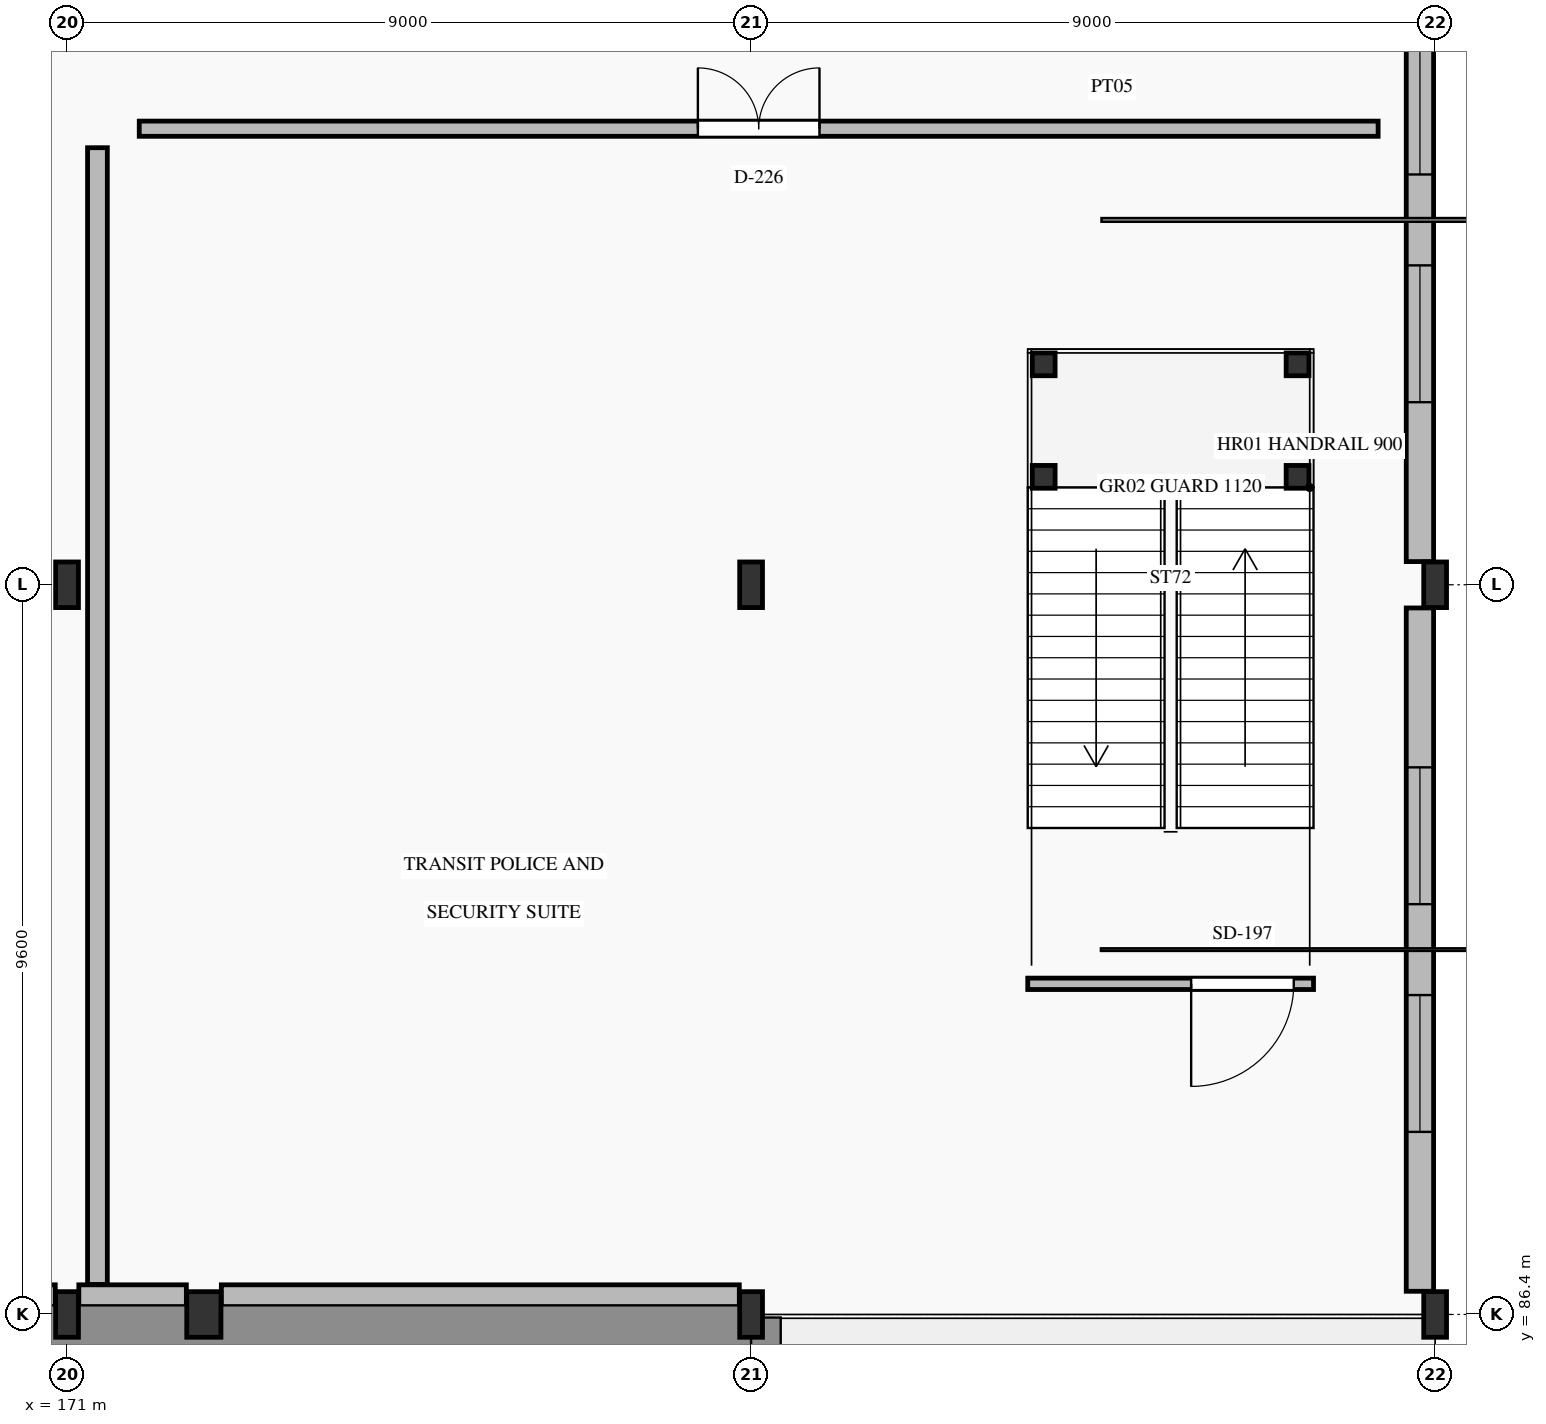
"""IFC4 building model, lengths in metres.
Left out: names, types, materials, properties, quantities, classifications, styles, units other than length and angle.
Written with IfcOpenShell. Run it as: python <this file> out.ifc"""

import sys

from ifc_helpers import new_model, si_unit, direction, frame, frame_2d, origin, origin_2d, place, context, subcontext, project, spatial, rectangle, i_section, extrude, element, fill, save


model = new_model("IFC4")
c1 = context("Model", 3, precision=1e-05, world=origin(), true_north=direction((0.0, 1.0)))
c2 = subcontext(c1, "Body", "Model", "MODEL_VIEW")
j1 = project(units=[si_unit("LENGTHUNIT", "METRE"), si_unit("PLANEANGLEUNIT", "RADIAN")], contexts=[c1])
p1 = place(None, origin())
s1 = spatial("IfcSite", under=j1, at=p1, CompositionType="ELEMENT")
p2 = place(p1, origin())
s2 = spatial("IfcBuilding", under=s1, at=p2, CompositionType="ELEMENT")
p3 = place(p2, origin())
s3 = spatial("IfcBuildingStorey", under=s2, at=p3, CompositionType="ELEMENT", Elevation=0.0)
for number, where, z_axis, x_axis in (
    (1, (171.0, 86.4, 0.0), (0.0, 0.0, 1.0), (1.0, 0.0, 0.0)),
    (2, (171.0, 96.0, 0.0), (0.0, 0.0, 1.0), (1.0, 0.0, 0.0)),
    (3, (180.0, 86.4, 0.0), (0.0, 0.0, 1.0), (1.0, 0.0, 0.0)),
    (4, (180.0, 96.0, 0.0), (0.0, 0.0, 1.0), (1.0, 0.0, 0.0)),
    (5, (189.0, 86.4, 0.0), (0.0, 0.0, 1.0), (1.0, 0.0, 0.0)),
    (6, (189.0, 96.0, 0.0), (0.0, 0.0, 1.0), (1.0, 0.0, 0.0)),
):
    element("IfcColumn", number, at=place(p3, frame(where, z_axis=z_axis, x_axis=x_axis)), inside=s3, PredefinedType="COLUMN", context=c2, shape_type="SweptSolid", body=[
        extrude(i_section(OverallWidth=0.3, OverallDepth=0.6, WebThickness=0.015, FlangeThickness=0.03, FilletRadius=0.027, at=origin_2d()), origin(), (0.0, 0.0, 1.0), 6.0),
    ])
p4 = place(p3, frame((172.8, 86.4, 0.0), z_axis=(0.0, 0.0, 1.0), x_axis=(1.0, 0.0, 0.0)))
e7 = element("IfcColumn", 7, at=p4, inside=s3, PredefinedType="PILASTER", context=c2, shape_type="SweptSolid", body=[
    extrude(rectangle(XDim=0.45, YDim=0.6, at=origin_2d()), origin(), (0.0, 0.0, 1.0), 6.0),
])
p5 = place(p3, frame((164.03, 86.6, 0.0), z_axis=(0.0, 0.0, 1.0), x_axis=(1.0, 0.0, 0.0)))
e8 = element("IfcWall", 8, at=p5, inside=s3, PredefinedType="SOLIDWALL", context=c2, shape_type="SweptSolid", body=[
    extrude(rectangle(XDim=6.815, YDim=0.38, at=frame_2d((3.407, 0.0))), origin(), (0.0, 0.0, 1.0), 5.49),
])
p6 = place(p3, frame((171.155, 86.6, 0.0), z_axis=(0.0, 0.0, 1.0), x_axis=(1.0, 0.0, 0.0)))
e9 = element("IfcWall", 9, at=p6, inside=s3, PredefinedType="SOLIDWALL", context=c2, shape_type="SweptSolid", body=[
    extrude(rectangle(XDim=1.415, YDim=0.38, at=frame_2d((0.708, 0.0))), origin(), (0.0, 0.0, 1.0), 5.49),
])
p7 = place(p3, frame((173.03, 86.6, 0.0), z_axis=(0.0, 0.0, 1.0), x_axis=(1.0, 0.0, 0.0)))
e10 = element("IfcWall", 10, at=p7, inside=s3, PredefinedType="SOLIDWALL", context=c2, shape_type="SweptSolid", body=[
    extrude(rectangle(XDim=6.815, YDim=0.38, at=frame_2d((3.407, 0.0))), origin(), (0.0, 0.0, 1.0), 5.49),
])
p8 = place(p3, frame((188.8, 86.705, 0.0), z_axis=(0.0, 0.0, 1.0), x_axis=(0.0, 1.0, 0.0)))
e11 = element("IfcWall", 11, at=p8, inside=s3, PredefinedType="SOLIDWALL", context=c2, shape_type="SweptSolid", body=[
    extrude(rectangle(XDim=8.99, YDim=0.36, at=frame_2d((4.495, 0.0))), origin(), (0.0, 0.0, 1.0), 5.4),
])
p9 = place(p8, frame((2.097, 0.0, 0.95)))
e12 = element("IfcOpeningElement", 12, at=p9, cuts=e11, PredefinedType="OPENING", context=c2, shape_type="SweptSolid", body=[
    extrude(rectangle(XDim=1.8, YDim=2.8, at=frame_2d((0.9, 1.4))), frame((0.0, 0.195, 0.0), z_axis=(0.0, -1.0, 0.0), x_axis=(1.0, 0.0, 0.0)), (0.0, 0.0, 1.0), 0.39),
])
p10 = place(p8, frame((5.093, 0.0, 0.95)))
e13 = element("IfcOpeningElement", 13, at=p10, cuts=e11, PredefinedType="OPENING", context=c2, shape_type="SweptSolid", body=[
    extrude(rectangle(XDim=1.8, YDim=2.8, at=frame_2d((0.9, 1.4))), frame((0.0, 0.195, 0.0), z_axis=(0.0, -1.0, 0.0), x_axis=(1.0, 0.0, 0.0)), (0.0, 0.0, 1.0), 0.39),
])
p11 = place(p3, frame((188.8, 96.305, 0.0), z_axis=(0.0, 0.0, 1.0), x_axis=(0.0, 1.0, 0.0)))
e14 = element("IfcWall", 14, at=p11, inside=s3, PredefinedType="SOLIDWALL", context=c2, shape_type="SweptSolid", body=[
    extrude(rectangle(XDim=8.99, YDim=0.36, at=frame_2d((4.495, 0.0))), origin(), (0.0, 0.0, 1.0), 5.4),
])
p12 = place(p11, frame((2.097, 0.0, 0.95)))
e15 = element("IfcOpeningElement", 15, at=p12, cuts=e14, PredefinedType="OPENING", context=c2, shape_type="SweptSolid", body=[
    extrude(rectangle(XDim=1.8, YDim=2.8, at=frame_2d((0.9, 1.4))), frame((0.0, 0.195, 0.0), z_axis=(0.0, -1.0, 0.0), x_axis=(1.0, 0.0, 0.0)), (0.0, 0.0, 1.0), 0.39),
])
p13 = place(p11, frame((5.093, 0.0, 0.95)))
e16 = element("IfcOpeningElement", 16, at=p13, cuts=e14, PredefinedType="OPENING", context=c2, shape_type="SweptSolid", body=[
    extrude(rectangle(XDim=1.8, YDim=2.8, at=frame_2d((0.9, 1.4))), frame((0.0, 0.195, 0.0), z_axis=(0.0, -1.0, 0.0), x_axis=(1.0, 0.0, 0.0)), (0.0, 0.0, 1.0), 0.39),
])
for number, where, z_axis, x_axis in (
    (17, (183.85, 98.9, 0.0), (0.0, 0.0, 1.0), (1.0, 0.0, 0.0)),
    (18, (183.85, 97.42, 0.0), (0.0, 0.0, 1.0), (1.0, 0.0, 0.0)),
    (19, (187.19, 98.9, 0.0), (0.0, 0.0, 1.0), (1.0, 0.0, 0.0)),
    (20, (187.19, 97.42, 0.0), (0.0, 0.0, 1.0), (1.0, 0.0, 0.0)),
):
    element("IfcColumn", number, at=place(p3, frame(where, z_axis=z_axis, x_axis=x_axis)), inside=s3, PredefinedType="COLUMN", context=c2, shape_type="SweptSolid", body=[
        extrude(i_section(OverallWidth=0.3, OverallDepth=0.3, WebThickness=0.011, FlangeThickness=0.019, FilletRadius=0.027, at=origin_2d()), origin(), (0.0, 0.0, 1.0), 2.8),
    ])
p14 = place(p3, frame((183.64, 90.75, 0.0), z_axis=(0.0, 0.0, 1.0), x_axis=(1.0, 0.0, 0.0)))
e21 = element("IfcWall", 21, at=p14, inside=s3, PredefinedType="PARTITIONING", context=c2, shape_type="SweptSolid", body=[
    extrude(rectangle(XDim=3.76, YDim=0.15, at=frame_2d((1.88, 0.0))), origin(), (0.0, 0.0, 1.0), 5.72),
])
p15 = place(p14, frame((2.15, 0.0, 0.0)))
e22 = element("IfcOpeningElement", 22, at=p15, cuts=e21, PredefinedType="OPENING", context=c2, shape_type="SweptSolid", body=[
    extrude(rectangle(XDim=1.35, YDim=2.2, at=frame_2d((0.675, 1.1))), frame((0.0, 0.09, 0.0), z_axis=(0.0, -1.0, 0.0), x_axis=(1.0, 0.0, 0.0)), (0.0, 0.0, 1.0), 0.18),
])
p16 = place(p3, frame((171.95, 102.0, 0.0), z_axis=(0.0, 0.0, 1.0), x_axis=(1.0, 0.0, 0.0)))
e23 = element("IfcWall", 23, at=p16, inside=s3, PredefinedType="PARTITIONING", context=c2, shape_type="SweptSolid", body=[
    extrude(rectangle(XDim=16.3, YDim=0.2, at=frame_2d((8.15, 0.0))), origin(), (0.0, 0.0, 1.0), 5.72),
])
p17 = place(p16, frame((7.35, 0.0, 0.0)))
e24 = element("IfcOpeningElement", 24, at=p17, cuts=e23, PredefinedType="OPENING", context=c2, shape_type="SweptSolid", body=[
    extrude(rectangle(XDim=1.6, YDim=2.25, at=frame_2d((0.8, 1.125))), frame((0.0, 0.115, 0.0), z_axis=(0.0, -1.0, 0.0), x_axis=(1.0, 0.0, 0.0)), (0.0, 0.0, 1.0), 0.23),
])
p18 = place(p3, frame((171.4, 86.795, 0.0), z_axis=(0.0, 0.0, 1.0), x_axis=(0.0, 1.0, 0.0)))
e25 = element("IfcWall", 25, at=p18, inside=s3, PredefinedType="PARTITIONING", context=c2, shape_type="SweptSolid", body=[
    extrude(rectangle(XDim=14.955, YDim=0.26, at=frame_2d((7.478, 0.0))), origin(), (0.0, 0.0, 1.0), 5.72),
])
p19 = place(p9, origin())
e26 = element("IfcWindow", 26, at=p19, inside=s3, PartitioningType="SINGLE_PANEL", PredefinedType="WINDOW", context=c2, shape_type="SweptSolid", body=[
    extrude(rectangle(XDim=1.8, YDim=2.8, at=frame_2d((0.9, 1.4))), frame((0.0, 0.03, 0.0), z_axis=(0.0, -1.0, 0.0), x_axis=(1.0, 0.0, 0.0)), (0.0, 0.0, 1.0), 0.06),
])
fill(e12, e26)
p20 = place(p10, origin())
e27 = element("IfcWindow", 27, at=p20, inside=s3, PartitioningType="SINGLE_PANEL", PredefinedType="WINDOW", context=c2, shape_type="SweptSolid", body=[
    extrude(rectangle(XDim=1.8, YDim=2.8, at=frame_2d((0.9, 1.4))), frame((0.0, 0.03, 0.0), z_axis=(0.0, -1.0, 0.0), x_axis=(1.0, 0.0, 0.0)), (0.0, 0.0, 1.0), 0.06),
])
fill(e13, e27)
p21 = place(p12, origin())
e28 = element("IfcWindow", 28, at=p21, inside=s3, PartitioningType="SINGLE_PANEL", PredefinedType="WINDOW", context=c2, shape_type="SweptSolid", body=[
    extrude(rectangle(XDim=1.8, YDim=2.8, at=frame_2d((0.9, 1.4))), frame((0.0, 0.03, 0.0), z_axis=(0.0, -1.0, 0.0), x_axis=(1.0, 0.0, 0.0)), (0.0, 0.0, 1.0), 0.06),
])
fill(e15, e28)
p22 = place(p13, origin())
e29 = element("IfcWindow", 29, at=p22, inside=s3, PartitioningType="SINGLE_PANEL", PredefinedType="WINDOW", context=c2, shape_type="SweptSolid", body=[
    extrude(rectangle(XDim=1.8, YDim=2.8, at=frame_2d((0.9, 1.4))), frame((0.0, 0.03, 0.0), z_axis=(0.0, -1.0, 0.0), x_axis=(1.0, 0.0, 0.0)), (0.0, 0.0, 1.0), 0.06),
])
fill(e16, e29)
p23 = place(p15, frame((1.35, 0.0, 0.0), z_axis=(0.0, 0.0, 1.0), x_axis=(-1.0, 0.0, 0.0)))
e30 = element("IfcDoor", 30, at=p23, inside=s3, OperationType="SINGLE_SWING_LEFT", PredefinedType="DOOR", context=c2, shape_type="SweptSolid", body=[
    extrude(rectangle(XDim=1.35, YDim=2.2, at=frame_2d((0.675, 1.1))), frame((0.0, 0.025, 0.0), z_axis=(0.0, -1.0, 0.0), x_axis=(1.0, 0.0, 0.0)), (0.0, 0.0, 1.0), 0.05),
])
fill(e22, e30)
p24 = place(p17, origin())
e31 = element("IfcDoor", 31, at=p24, inside=s3, OperationType="DOUBLE_DOOR_SINGLE_SWING", PredefinedType="DOOR", context=c2, shape_type="SweptSolid", body=[
    extrude(rectangle(XDim=1.6, YDim=2.25, at=frame_2d((0.8, 1.125))), frame((0.0, 0.025, 0.0), z_axis=(0.0, -1.0, 0.0), x_axis=(1.0, 0.0, 0.0)), (0.0, 0.0, 1.0), 0.05),
])
fill(e24, e31)
save(model, sys.argv[1])
